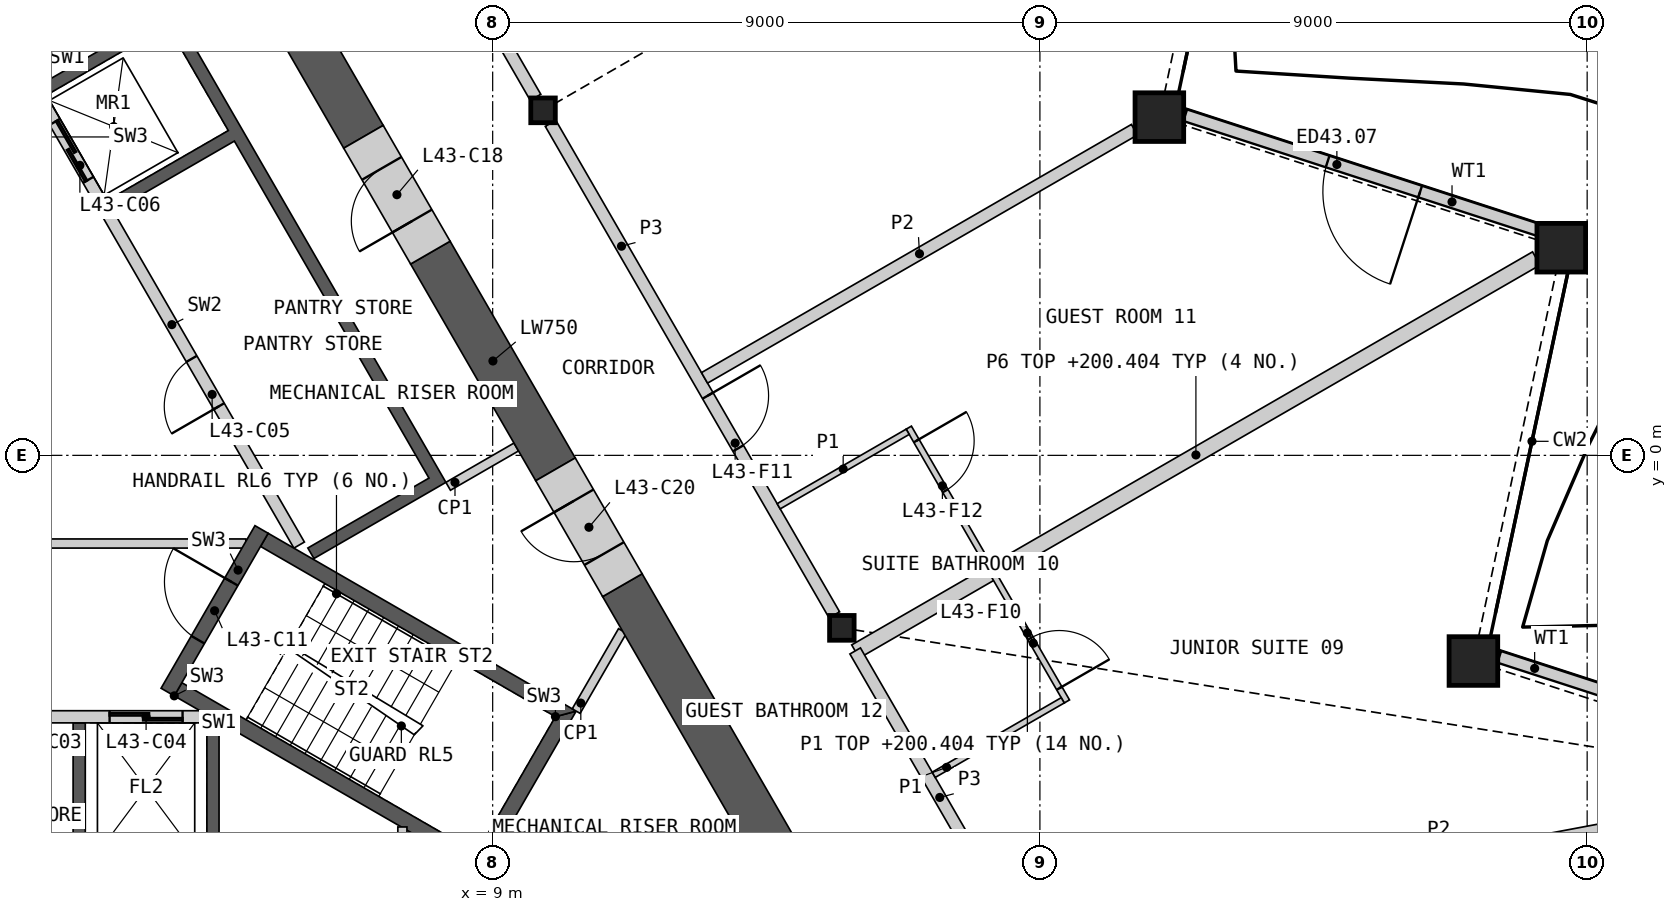
"""IFC4 building model, lengths in metres.
Left out: names, types, materials, properties, quantities, classifications, styles, units other than length and angle.
Written with IfcOpenShell. Run it as: python <this file> out.ifc"""

import sys

from ifc_helpers import new_model, si_unit, direction, frame, frame_2d, origin, origin_2d, place, context, subcontext, project, spatial, polyline, rectangle, hollow_rectangle, i_section, outline, extrude, element, fill, save


model = new_model("IFC4")
c1 = context("Model", 3, precision=1e-05, world=origin(), true_north=direction((0.0, 1.0)))
c2 = subcontext(c1, "Body", "Model", "MODEL_VIEW")
j1 = project(units=[si_unit("LENGTHUNIT", "METRE"), si_unit("PLANEANGLEUNIT", "RADIAN")], contexts=[c1])
p1 = place(None, origin())
s1 = spatial("IfcSite", under=j1, at=p1, CompositionType="ELEMENT")
p2 = place(p1, origin())
s2 = spatial("IfcBuilding", under=s1, at=p2, CompositionType="ELEMENT")
p3 = place(p2, frame((0.0, 0.0, 198.0)))
s3 = spatial("IfcBuildingStorey", under=s2, at=p3, CompositionType="ELEMENT", Elevation=198.0)
for number, where, z_axis, x_axis in (
    (1, (25.129, -3.383, 0.0), (0.0, 0.0, 1.0), (1.0, 0.0, 0.0)),
    (2, (26.574, 3.415, 0.0), (0.0, 0.0, 1.0), (1.0, 0.0, 0.0)),
    (3, (19.965, 5.563, 0.0), (0.0, 0.0, 1.0), (1.0, 0.0, 0.0)),
):
    element("IfcColumn", number, at=place(p3, frame(where, z_axis=z_axis, x_axis=x_axis)), inside=s3, PredefinedType="COLUMN", context=c2, shape_type="SweptSolid", body=[
        extrude(hollow_rectangle(XDim=0.8, YDim=0.8, WallThickness=0.05, at=origin_2d()), origin(), (0.0, 0.0, 1.0), 3.6),
    ])
for number, where, z_axis, x_axis in (
    (4, (14.743, -2.837, 0.0), (0.0, 0.0, 1.0), (1.0, 0.0, 0.0)),
    (5, (9.828, 5.675, 0.0), (0.0, 0.0, 1.0), (1.0, 0.0, 0.0)),
):
    element("IfcColumn", number, at=place(p3, frame(where, z_axis=z_axis, x_axis=x_axis)), inside=s3, PredefinedType="COLUMN", context=c2, shape_type="SweptSolid", body=[
        extrude(i_section(OverallWidth=0.404, OverallDepth=0.407, WebThickness=0.027, FlangeThickness=0.044, at=origin_2d()), origin(), (0.0, 0.0, 1.0), 3.6),
    ])
p4 = place(p3, frame((31.379, -5.207, 0.0), z_axis=(0.0, 0.0, 1.0), x_axis=(-0.951059550827, 0.30900765489, 0.0)))
e6 = element("IfcWall", 6, at=p4, inside=s3, PredefinedType="SOLIDWALL", context=c2, shape_type="SweptSolid", body=[
    extrude(rectangle(XDim=6.125, YDim=0.2, at=frame_2d((3.062, 0.0))), origin(), (0.0, 0.0, 1.0), 2.701),
])
p5 = place(p4, frame((2.089, 0.0, 0.0)))
e7 = element("IfcOpeningElement", 7, at=p5, cuts=e6, PredefinedType="OPENING", context=c2, shape_type="SweptSolid", body=[
    extrude(rectangle(XDim=1.6, YDim=2.4, at=frame_2d((0.8, 1.2))), frame((0.0, 0.11, 0.0), z_axis=(0.0, -1.0, 0.0), x_axis=(1.0, 0.0, 0.0)), (0.0, 0.0, 1.0), 0.22),
])
p6 = place(p3, frame((26.24, 3.693, 0.0), z_axis=(0.0, 0.0, 1.0), x_axis=(-0.951053023356, 0.30902774433, 0.0)))
e8 = element("IfcWall", 8, at=p6, inside=s3, PredefinedType="SOLIDWALL", context=c2, shape_type="SweptSolid", body=[
    extrude(rectangle(XDim=6.152, YDim=0.2, at=frame_2d((3.076, 0.0))), origin(), (0.0, 0.0, 1.0), 2.701),
])
p7 = place(p6, frame((2.089, 0.0, 0.0)))
e9 = element("IfcOpeningElement", 9, at=p7, cuts=e8, PredefinedType="OPENING", context=c2, shape_type="SweptSolid", body=[
    extrude(rectangle(XDim=1.6, YDim=2.4, at=frame_2d((0.8, 1.2))), frame((0.0, 0.11, 0.0), z_axis=(0.0, -1.0, 0.0), x_axis=(1.0, 0.0, 0.0)), (0.0, 0.0, 1.0), 0.22),
])
p8 = place(p3, origin())
e10 = element("IfcWall", 10, at=p8, inside=s3, PredefinedType="SHEAR", context=c2, shape_type="SweptSolid", body=[
    extrude(outline(polyline([(4.5, -4.4), (4.5, -6.906), (2.1, -6.906), (2.1, -4.4), (2.3, -4.4), (2.3, -6.7), (4.3, -6.7), (4.3, -4.4), (4.5, -4.4)])), origin(), (0.0, 0.0, 1.0), 3.25),
])
p9 = place(p3, frame((-4.187, -4.3, 0.0), z_axis=(0.0, 0.0, 1.0), x_axis=(1.0, 0.0, 0.0)))
e11 = element("IfcWall", 11, at=p9, inside=s3, PredefinedType="SOLIDWALL", context=c2, shape_type="SweptSolid", body=[
    extrude(rectangle(XDim=8.373, YDim=0.2, at=frame_2d((4.187, 0.0))), origin(), (0.0, 0.0, 1.0), 3.25),
])
p10 = place(p9, frame((0.287, 0.0, 0.0)))
e12 = element("IfcOpeningElement", 12, at=p10, cuts=e11, PredefinedType="OPENING", context=c2, shape_type="SweptSolid", body=[
    extrude(rectangle(XDim=1.2, YDim=2.1, at=frame_2d((0.6, 1.05))), frame((0.0, 0.11, 0.0), z_axis=(0.0, -1.0, 0.0), x_axis=(1.0, 0.0, 0.0)), (0.0, 0.0, 1.0), 0.22),
])
p11 = place(p9, frame((2.387, 0.0, 0.0)))
e13 = element("IfcOpeningElement", 13, at=p11, cuts=e11, PredefinedType="OPENING", context=c2, shape_type="SweptSolid", body=[
    extrude(rectangle(XDim=1.4, YDim=2.1, at=frame_2d((0.7, 1.05))), frame((0.0, 0.11, 0.0), z_axis=(0.0, -1.0, 0.0), x_axis=(1.0, 0.0, 0.0)), (0.0, 0.0, 1.0), 0.22),
])
p12 = place(p9, frame((4.837, 0.0, 0.0)))
e14 = element("IfcOpeningElement", 14, at=p12, cuts=e11, PredefinedType="OPENING", context=c2, shape_type="SweptSolid", body=[
    extrude(rectangle(XDim=0.9, YDim=2.1, at=frame_2d((0.45, 1.05))), frame((0.0, 0.11, 0.0), z_axis=(0.0, -1.0, 0.0), x_axis=(1.0, 0.0, 0.0)), (0.0, 0.0, 1.0), 0.22),
])
p13 = place(p9, frame((6.887, 0.0, 0.0)))
e15 = element("IfcOpeningElement", 15, at=p13, cuts=e11, PredefinedType="OPENING", context=c2, shape_type="SweptSolid", body=[
    extrude(rectangle(XDim=1.2, YDim=2.1, at=frame_2d((0.6, 1.05))), frame((0.0, 0.11, 0.0), z_axis=(0.0, -1.0, 0.0), x_axis=(1.0, 0.0, 0.0)), (0.0, 0.0, 1.0), 0.22),
])
p14 = place(p3, origin())
e16 = element("IfcWall", 16, at=p14, inside=s3, PredefinedType="SHEAR", context=c2, shape_type="SweptSolid", body=[
    extrude(outline(polyline([(1.561, 6.097), (3.731, 7.35), (8.231, -0.444), (6.061, -1.697), (5.96, -1.524), (7.952, -0.374), (4.752, 5.169), (2.76, 4.019), (2.66, 4.192), (4.652, 5.342), (3.652, 7.074), (1.66, 5.924), (1.561, 6.097)])), origin(), (0.0, 0.0, 1.0), 3.25),
])
p15 = place(p3, frame((5.817, -1.476, 0.0), z_axis=(0.0, 0.0, 1.0), x_axis=(-0.500002616675, 0.866023893041, 0.0)))
e17 = element("IfcWall", 17, at=p15, inside=s3, PredefinedType="SOLIDWALL", context=c2, shape_type="SweptSolid", body=[
    extrude(rectangle(XDim=8.373, YDim=0.2, at=frame_2d((4.187, 0.0))), origin(), (0.0, 0.0, 1.0), 3.25),
])
p16 = place(p15, frame((2.637, 0.0, 0.0)))
e18 = element("IfcOpeningElement", 18, at=p16, cuts=e17, PredefinedType="OPENING", context=c2, shape_type="SweptSolid", body=[
    extrude(rectangle(XDim=0.9, YDim=2.1, at=frame_2d((0.45, 1.05))), frame((0.0, 0.11, 0.0), z_axis=(0.0, -1.0, 0.0), x_axis=(1.0, 0.0, 0.0)), (0.0, 0.0, 1.0), 0.22),
])
p17 = place(p15, frame((6.937, 0.0, 0.0)))
e19 = element("IfcOpeningElement", 19, at=p17, cuts=e17, PredefinedType="OPENING", context=c2, shape_type="SweptSolid", body=[
    extrude(rectangle(XDim=1.1, YDim=2.1, at=frame_2d((0.55, 1.05))), frame((0.0, 0.11, 0.0), z_axis=(0.0, -1.0, 0.0), x_axis=(1.0, 0.0, 0.0)), (0.0, 0.0, 1.0), 0.22),
])
p18 = place(p3, frame((-4.941, -1.45, 0.0), z_axis=(0.0, 0.0, 1.0), x_axis=(1.0, 0.0, 0.0)))
e20 = element("IfcWall", 20, at=p18, inside=s3, PredefinedType="PARTITIONING", context=c2, shape_type="SweptSolid", body=[
    extrude(rectangle(XDim=9.882, YDim=0.15, at=frame_2d((4.941, 0.0))), origin(), (0.0, 0.0, 1.0), 3.25),
])
p19 = place(p18, frame((4.391, 0.0, 0.0)))
e21 = element("IfcOpeningElement", 21, at=p19, cuts=e20, PredefinedType="OPENING", context=c2, shape_type="SweptSolid", body=[
    extrude(rectangle(XDim=1.1, YDim=2.1, at=frame_2d((0.55, 1.05))), frame((0.0, 0.085, 0.0), z_axis=(0.0, -1.0, 0.0), x_axis=(1.0, 0.0, 0.0)), (0.0, 0.0, 1.0), 0.17),
])
p20 = place(p3, origin())
e22 = element("IfcWall", 22, at=p20, inside=s3, PredefinedType="SHEAR", context=c2, shape_type="SweptSolid", body=[
    extrude(outline(polyline([(3.763, -3.956), (8.83, -6.881), (8.738, -6.539), (3.888, -3.739), (3.763, -3.956)])), origin(), (0.0, 0.0, 1.0), 3.25),
])
p21 = place(p3, origin())
e23 = element("IfcWall", 23, at=p21, inside=s3, PredefinedType="SHEAR", context=c2, shape_type="SweptSolid", body=[
    extrude(outline(polyline([(8.83, -6.881), (10.374, -4.206), (10.032, -4.298), (8.738, -6.539), (8.83, -6.881)])), origin(), (0.0, 0.0, 1.0), 3.25),
])
p22 = place(p3, origin())
e24 = element("IfcWall", 24, at=p22, inside=s3, PredefinedType="SHEAR", context=c2, shape_type="SweptSolid", body=[
    extrude(outline(polyline([(10.032, -4.298), (10.374, -4.206), (5.307, -1.281), (5.182, -1.498), (10.032, -4.298)])), origin(), (0.0, 0.0, 1.0), 3.25),
])
p23 = place(p3, frame((3.655, -3.893, 0.0), z_axis=(0.0, 0.0, 1.0), x_axis=(0.499982516597, 0.866035497597, 0.0)))
e25 = element("IfcWall", 25, at=p23, inside=s3, PredefinedType="SHEAR", context=c2, shape_type="SweptSolid", body=[
    extrude(rectangle(XDim=3.088, YDim=0.25, at=frame_2d((1.544, 0.0))), origin(), (0.0, 0.0, 1.0), 3.25),
])
p24 = place(p23, frame((0.994, 0.0, 0.0)))
e26 = element("IfcOpeningElement", 26, at=p24, cuts=e25, PredefinedType="OPENING", context=c2, shape_type="SweptSolid", body=[
    extrude(rectangle(XDim=1.1, YDim=2.1, at=frame_2d((0.55, 1.05))), frame((0.0, 0.135, 0.0), z_axis=(0.0, -1.0, 0.0), x_axis=(1.0, 0.0, 0.0)), (0.0, 0.0, 1.0), 0.27),
])
p25 = place(p3, frame((8.268, -0.509, 0.0), z_axis=(0.0, 0.0, 1.0), x_axis=(0.866003189247, 0.500038474733, 0.0)))
e27 = element("IfcWall", 27, at=p25, inside=s3, PredefinedType="PARTITIONING", context=c2, shape_type="SweptSolid", body=[
    extrude(rectangle(XDim=1.293, YDim=0.15, at=frame_2d((0.646, 0.0))), origin(), (0.0, 0.0, 1.0), 3.25),
])
p26 = place(p3, frame((7.515, -8.199, 0.0), z_axis=(0.0, 0.0, 1.0), x_axis=(0.0, 1.0, 0.0)))
e28 = element("IfcWall", 28, at=p26, inside=s3, PredefinedType="PARTITIONING", context=c2, shape_type="SweptSolid", body=[
    extrude(rectangle(XDim=2.087, YDim=0.15, at=frame_2d((1.043, 0.0))), origin(), (0.0, 0.0, 1.0), 3.25),
])
p27 = place(p3, frame((10.374, -4.206, 0.0), z_axis=(0.0, 0.0, 1.0), x_axis=(0.500037110984, 0.866003976688, 0.0)))
e29 = element("IfcWall", 29, at=p27, inside=s3, PredefinedType="PARTITIONING", context=c2, shape_type="SweptSolid", body=[
    extrude(rectangle(XDim=1.522, YDim=0.15, at=frame_2d((0.761, 0.0))), origin(), (0.0, 0.0, 1.0), 3.25),
])
p28 = place(p3, frame((6.875, 5.24, 0.0), z_axis=(0.0, 0.0, 1.0), x_axis=(-0.499997217876, 0.866027010039, 0.0)))
e30 = element("IfcWall", 30, at=p28, inside=s3, PredefinedType="SHEAR", context=c2, shape_type="SweptSolid", body=[
    extrude(rectangle(XDim=13.101, YDim=0.75, at=frame_2d((6.551, 0.0))), origin(), (0.0, 0.0, 1.0), 3.25),
])
p29 = place(p3, frame((14.526, -8.011, 0.0), z_axis=(0.0, 0.0, 1.0), x_axis=(-0.499982018922, 0.866035784916, 0.0)))
e31 = element("IfcWall", 31, at=p29, inside=s3, PredefinedType="SHEAR", context=c2, shape_type="SweptSolid", body=[
    extrude(rectangle(XDim=6.785, YDim=0.75, at=frame_2d((3.393, 0.0))), origin(), (0.0, 0.0, 1.0), 3.25),
])
p30 = place(p3, frame((10.033, -0.23, 0.0), z_axis=(0.0, 0.0, 1.0), x_axis=(-0.500030520673, 0.866007781949, 0.0)))
e32 = element("IfcWall", 32, at=p30, inside=s3, PredefinedType="SHEAR", context=c2, shape_type="SweptSolid", body=[
    extrude(rectangle(XDim=4.116, YDim=0.75, at=frame_2d((2.058, 0.0))), origin(), (0.0, 0.0, 1.0), 3.25),
])
p31 = place(p3, frame((7.975, 3.334, 0.0), z_axis=(0.0, 0.0, 1.0), x_axis=(-0.500077893725, 0.86598042715, 0.0)))
e33 = element("IfcWall", 33, at=p31, inside=s3, PredefinedType="SHEAR", context=c2, shape_type="SweptSolid", body=[
    extrude(rectangle(XDim=2.2, YDim=0.75, at=frame_2d((1.1, 0.0))), origin(), (0.0, 0.0, 1.0), 3.25),
])
p32 = place(p31, frame((0.6, 0.0, 0.0)))
e34 = element("IfcOpeningElement", 34, at=p32, cuts=e33, PredefinedType="OPENING", context=c2, shape_type="SweptSolid", body=[
    extrude(rectangle(XDim=1.0, YDim=2.1, at=frame_2d((0.5, 1.05))), frame((0.0, 0.385, 0.0), z_axis=(0.0, -1.0, 0.0), x_axis=(1.0, 0.0, 0.0)), (0.0, 0.0, 1.0), 0.77),
])
p33 = place(p3, frame((11.133, -2.135, 0.0), z_axis=(0.0, 0.0, 1.0), x_axis=(-0.499981787252, 0.866035918664, 0.0)))
e35 = element("IfcWall", 35, at=p33, inside=s3, PredefinedType="SHEAR", context=c2, shape_type="SweptSolid", body=[
    extrude(rectangle(XDim=2.2, YDim=0.75, at=frame_2d((1.1, 0.0))), origin(), (0.0, 0.0, 1.0), 3.25),
])
p34 = place(p33, frame((0.6, 0.0, 0.0)))
e36 = element("IfcOpeningElement", 36, at=p34, cuts=e35, PredefinedType="OPENING", context=c2, shape_type="SweptSolid", body=[
    extrude(rectangle(XDim=1.0, YDim=2.1, at=frame_2d((0.5, 1.05))), frame((0.0, 0.385, 0.0), z_axis=(0.0, -1.0, 0.0), x_axis=(1.0, 0.0, 0.0)), (0.0, 0.0, 1.0), 0.77),
])
p35 = place(p3, frame((14.967, -3.226, 0.0), z_axis=(0.0, 0.0, 1.0), x_axis=(0.866030250269, 0.499991605548, 0.0)))
e37 = element("IfcWall", 37, at=p35, inside=s3, PredefinedType="PARTITIONING", context=c2, shape_type="SweptSolid", body=[
    extrude(rectangle(XDim=12.929, YDim=0.25, at=frame_2d((6.465, 0.0))), origin(), (0.0, 0.0, 1.0), 2.404),
])
p36 = place(p3, frame((5.038, 13.972, 0.0), z_axis=(0.0, 0.0, 1.0), x_axis=(0.50000393355, -0.866023132736, 0.0)))
e38 = element("IfcWall", 38, at=p36, inside=s3, PredefinedType="PARTITIONING", context=c2, shape_type="SweptSolid", body=[
    extrude(rectangle(XDim=9.335, YDim=0.2, at=frame_2d((4.667, 0.0))), origin(), (0.0, 0.0, 1.0), 3.25),
])
p37 = place(p36, frame((5.979, 0.0, 0.0)))
e39 = element("IfcOpeningElement", 39, at=p37, cuts=e38, PredefinedType="OPENING", context=c2, shape_type="SweptSolid", body=[
    extrude(rectangle(XDim=1.8, YDim=2.1, at=frame_2d((0.9, 1.05))), frame((0.0, 0.11, 0.0), z_axis=(0.0, -1.0, 0.0), x_axis=(1.0, 0.0, 0.0)), (0.0, 0.0, 1.0), 0.22),
])
p38 = place(p36, frame((3.163, 0.0, 0.0)))
e40 = element("IfcOpeningElement", 40, at=p38, cuts=e38, PredefinedType="OPENING", context=c2, shape_type="SweptSolid", body=[
    extrude(rectangle(XDim=1.0, YDim=2.1, at=frame_2d((0.5, 1.05))), frame((0.0, 0.11, 0.0), z_axis=(0.0, -1.0, 0.0), x_axis=(1.0, 0.0, 0.0)), (0.0, 0.0, 1.0), 0.22),
])
p39 = place(p3, frame((9.952, 5.461, 0.0), z_axis=(0.0, 0.0, 1.0), x_axis=(0.50000393355, -0.866023132736, 0.0)))
e41 = element("IfcWall", 41, at=p39, inside=s3, PredefinedType="PARTITIONING", context=c2, shape_type="SweptSolid", body=[
    extrude(rectangle(XDim=9.335, YDim=0.2, at=frame_2d((4.667, 0.0))), origin(), (0.0, 0.0, 1.0), 3.25),
])
p40 = place(p39, frame((5.172, 0.0, 0.0)))
e42 = element("IfcOpeningElement", 42, at=p40, cuts=e41, PredefinedType="OPENING", context=c2, shape_type="SweptSolid", body=[
    extrude(rectangle(XDim=1.0, YDim=2.1, at=frame_2d((0.5, 1.05))), frame((0.0, 0.11, 0.0), z_axis=(0.0, -1.0, 0.0), x_axis=(1.0, 0.0, 0.0)), (0.0, 0.0, 1.0), 0.22),
])
p41 = place(p3, frame((14.962, -3.217, 0.0), z_axis=(0.0, 0.0, 1.0), x_axis=(0.500013660489, -0.866017516754, 0.0)))
e43 = element("IfcWall", 43, at=p41, inside=s3, PredefinedType="PARTITIONING", context=c2, shape_type="SweptSolid", body=[
    extrude(rectangle(XDim=5.564, YDim=0.2, at=frame_2d((2.782, 0.0))), origin(), (0.0, 0.0, 1.0), 3.25),
])
p42 = place(p41, frame((4.112, 0.0, 0.0)))
e44 = element("IfcOpeningElement", 44, at=p42, cuts=e43, PredefinedType="OPENING", context=c2, shape_type="SweptSolid", body=[
    extrude(rectangle(XDim=1.1, YDim=2.1, at=frame_2d((0.55, 1.05))), frame((0.0, 0.11, 0.0), z_axis=(0.0, -1.0, 0.0), x_axis=(1.0, 0.0, 0.0)), (0.0, 0.0, 1.0), 0.22),
])
p43 = place(p3, frame((17.792, -7.93, 0.0), z_axis=(0.0, 0.0, 1.0), x_axis=(0.982805703999, 0.184642758284, 0.0)))
e45 = element("IfcWall", 45, at=p43, inside=s3, PredefinedType="PARTITIONING", context=c2, shape_type="SweptSolid", body=[
    extrude(rectangle(XDim=13.774, YDim=0.2, at=frame_2d((6.887, 0.0))), origin(), (0.0, 0.0, 1.0), 2.404),
])
p44 = place(p3, frame((12.484, 1.274, 0.0), z_axis=(0.0, 0.0, 1.0), x_axis=(0.866026229868, 0.499998569178, 0.0)))
e46 = element("IfcWall", 46, at=p44, inside=s3, PredefinedType="PARTITIONING", context=c2, shape_type="SweptSolid", body=[
    extrude(rectangle(XDim=8.164, YDim=0.2, at=frame_2d((4.082, 0.0))), origin(), (0.0, 0.0, 1.0), 2.404),
])
p45 = place(p3, frame((15.844, 0.456, 0.0), z_axis=(0.0, 0.0, 1.0), x_axis=(0.500006934395, -0.866021400173, 0.0)))
e47 = element("IfcWall", 47, at=p45, inside=s3, PredefinedType="PARTITIONING", context=c2, shape_type="SweptSolid", body=[
    extrude(rectangle(XDim=5.2, YDim=0.1, at=frame_2d((2.6, 0.0))), origin(), (0.0, 0.0, 1.0), 2.404),
])
p46 = place(p45, frame((4.0, 0.0, 0.0)))
e48 = element("IfcOpeningElement", 48, at=p46, cuts=e47, PredefinedType="OPENING", context=c2, shape_type="SweptSolid", body=[
    extrude(rectangle(XDim=0.95, YDim=2.1, at=frame_2d((0.475, 1.05))), frame((0.0, 0.06, 0.0), z_axis=(0.0, -1.0, 0.0), x_axis=(1.0, 0.0, 0.0)), (0.0, 0.0, 1.0), 0.12),
])
p47 = place(p45, frame((0.25, 0.0, 0.0)))
e49 = element("IfcOpeningElement", 49, at=p47, cuts=e47, PredefinedType="OPENING", context=c2, shape_type="SweptSolid", body=[
    extrude(rectangle(XDim=0.95, YDim=2.1, at=frame_2d((0.475, 1.05))), frame((0.0, 0.06, 0.0), z_axis=(0.0, -1.0, 0.0), x_axis=(1.0, 0.0, 0.0)), (0.0, 0.0, 1.0), 0.12),
])
p48 = place(p3, frame((13.704, -0.837, 0.0), z_axis=(0.0, 0.0, 1.0), x_axis=(0.865989751695, 0.500061746146, 0.0)))
e50 = element("IfcWall", 50, at=p48, inside=s3, PredefinedType="PARTITIONING", context=c2, shape_type="SweptSolid", body=[
    extrude(rectangle(XDim=2.45, YDim=0.1, at=frame_2d((1.225, 0.0))), origin(), (0.0, 0.0, 1.0), 2.404),
])
p49 = place(p3, frame((16.254, -5.254, 0.0), z_axis=(0.0, 0.0, 1.0), x_axis=(0.866032905446, 0.499987006516, 0.0)))
e51 = element("IfcWall", 51, at=p49, inside=s3, PredefinedType="PARTITIONING", context=c2, shape_type="SweptSolid", body=[
    extrude(rectangle(XDim=2.45, YDim=0.1, at=frame_2d((1.225, 0.0))), origin(), (0.0, 0.0, 1.0), 2.404),
])
p50 = place(p7, origin())
e52 = element("IfcDoor", 52, at=p50, inside=s3, OperationType="DOUBLE_DOOR_SINGLE_SWING", PredefinedType="DOOR", context=c2, shape_type="SweptSolid", body=[
    extrude(rectangle(XDim=1.6, YDim=2.4, at=frame_2d((0.8, 1.2))), frame((0.0, 0.025, 0.0), z_axis=(0.0, -1.0, 0.0), x_axis=(1.0, 0.0, 0.0)), (0.0, 0.0, 1.0), 0.05),
])
fill(e9, e52)
p51 = place(p13, origin())
e53 = element("IfcDoor", 53, at=p51, inside=s3, OperationType="SLIDING_TO_LEFT", PredefinedType="DOOR", context=c2, shape_type="SweptSolid", body=[
    extrude(rectangle(XDim=1.2, YDim=2.1, at=frame_2d((0.6, 1.05))), frame((0.0, 0.025, 0.0), z_axis=(0.0, -1.0, 0.0), x_axis=(1.0, 0.0, 0.0)), (0.0, 0.0, 1.0), 0.05),
])
fill(e15, e53)
p52 = place(p16, origin())
e54 = element("IfcDoor", 54, at=p52, inside=s3, OperationType="SINGLE_SWING_LEFT", PredefinedType="DOOR", context=c2, shape_type="SweptSolid", body=[
    extrude(rectangle(XDim=0.9, YDim=2.1, at=frame_2d((0.45, 1.05))), frame((0.0, 0.025, 0.0), z_axis=(0.0, -1.0, 0.0), x_axis=(1.0, 0.0, 0.0)), (0.0, 0.0, 1.0), 0.05),
])
fill(e18, e54)
p53 = place(p17, origin())
e55 = element("IfcDoor", 55, at=p53, inside=s3, OperationType="SLIDING_TO_LEFT", PredefinedType="DOOR", context=c2, shape_type="SweptSolid", body=[
    extrude(rectangle(XDim=1.1, YDim=2.1, at=frame_2d((0.55, 1.05))), frame((0.0, 0.025, 0.0), z_axis=(0.0, -1.0, 0.0), x_axis=(1.0, 0.0, 0.0)), (0.0, 0.0, 1.0), 0.05),
])
fill(e19, e55)
p54 = place(p24, origin())
e56 = element("IfcDoor", 56, at=p54, inside=s3, OperationType="SINGLE_SWING_RIGHT", PredefinedType="DOOR", context=c2, shape_type="SweptSolid", body=[
    extrude(rectangle(XDim=1.1, YDim=2.1, at=frame_2d((0.55, 1.05))), frame((0.0, 0.025, 0.0), z_axis=(0.0, -1.0, 0.0), x_axis=(1.0, 0.0, 0.0)), (0.0, 0.0, 1.0), 0.05),
])
fill(e26, e56)
p55 = place(p32, origin())
e57 = element("IfcDoor", 57, at=p55, inside=s3, OperationType="SINGLE_SWING_LEFT", PredefinedType="DOOR", context=c2, shape_type="SweptSolid", body=[
    extrude(rectangle(XDim=1.0, YDim=2.1, at=frame_2d((0.5, 1.05))), frame((0.0, 0.13, 0.0), z_axis=(0.0, -1.0, 0.0), x_axis=(1.0, 0.0, 0.0)), (0.0, 0.0, 1.0), 0.05),
])
fill(e34, e57)
p56 = place(p34, origin())
e58 = element("IfcDoor", 58, at=p56, inside=s3, OperationType="SINGLE_SWING_RIGHT", PredefinedType="DOOR", context=c2, shape_type="SweptSolid", body=[
    extrude(rectangle(XDim=1.0, YDim=2.1, at=frame_2d((0.5, 1.05))), frame((0.0, 0.13, 0.0), z_axis=(0.0, -1.0, 0.0), x_axis=(1.0, 0.0, 0.0)), (0.0, 0.0, 1.0), 0.05),
])
fill(e36, e58)
p57 = place(p46, origin())
e59 = element("IfcDoor", 59, at=p57, inside=s3, OperationType="SINGLE_SWING_RIGHT", PredefinedType="DOOR", context=c2, shape_type="SweptSolid", body=[
    extrude(rectangle(XDim=0.95, YDim=2.1, at=frame_2d((0.475, 1.05))), frame((0.0, 0.025, 0.0), z_axis=(0.0, -1.0, 0.0), x_axis=(1.0, 0.0, 0.0)), (0.0, 0.0, 1.0), 0.05),
])
fill(e48, e59)
p58 = place(p40, origin())
e60 = element("IfcDoor", 60, at=p58, inside=s3, OperationType="SINGLE_SWING_LEFT", PredefinedType="DOOR", context=c2, shape_type="SweptSolid", body=[
    extrude(rectangle(XDim=1.0, YDim=2.1, at=frame_2d((0.5, 1.05))), frame((0.0, 0.025, 0.0), z_axis=(0.0, -1.0, 0.0), x_axis=(1.0, 0.0, 0.0)), (0.0, 0.0, 1.0), 0.05),
])
fill(e42, e60)
p59 = place(p47, origin())
e61 = element("IfcDoor", 61, at=p59, inside=s3, OperationType="SINGLE_SWING_LEFT", PredefinedType="DOOR", context=c2, shape_type="SweptSolid", body=[
    extrude(rectangle(XDim=0.95, YDim=2.1, at=frame_2d((0.475, 1.05))), frame((0.0, 0.025, 0.0), z_axis=(0.0, -1.0, 0.0), x_axis=(1.0, 0.0, 0.0)), (0.0, 0.0, 1.0), 0.05),
])
fill(e49, e61)
save(model, sys.argv[1])
